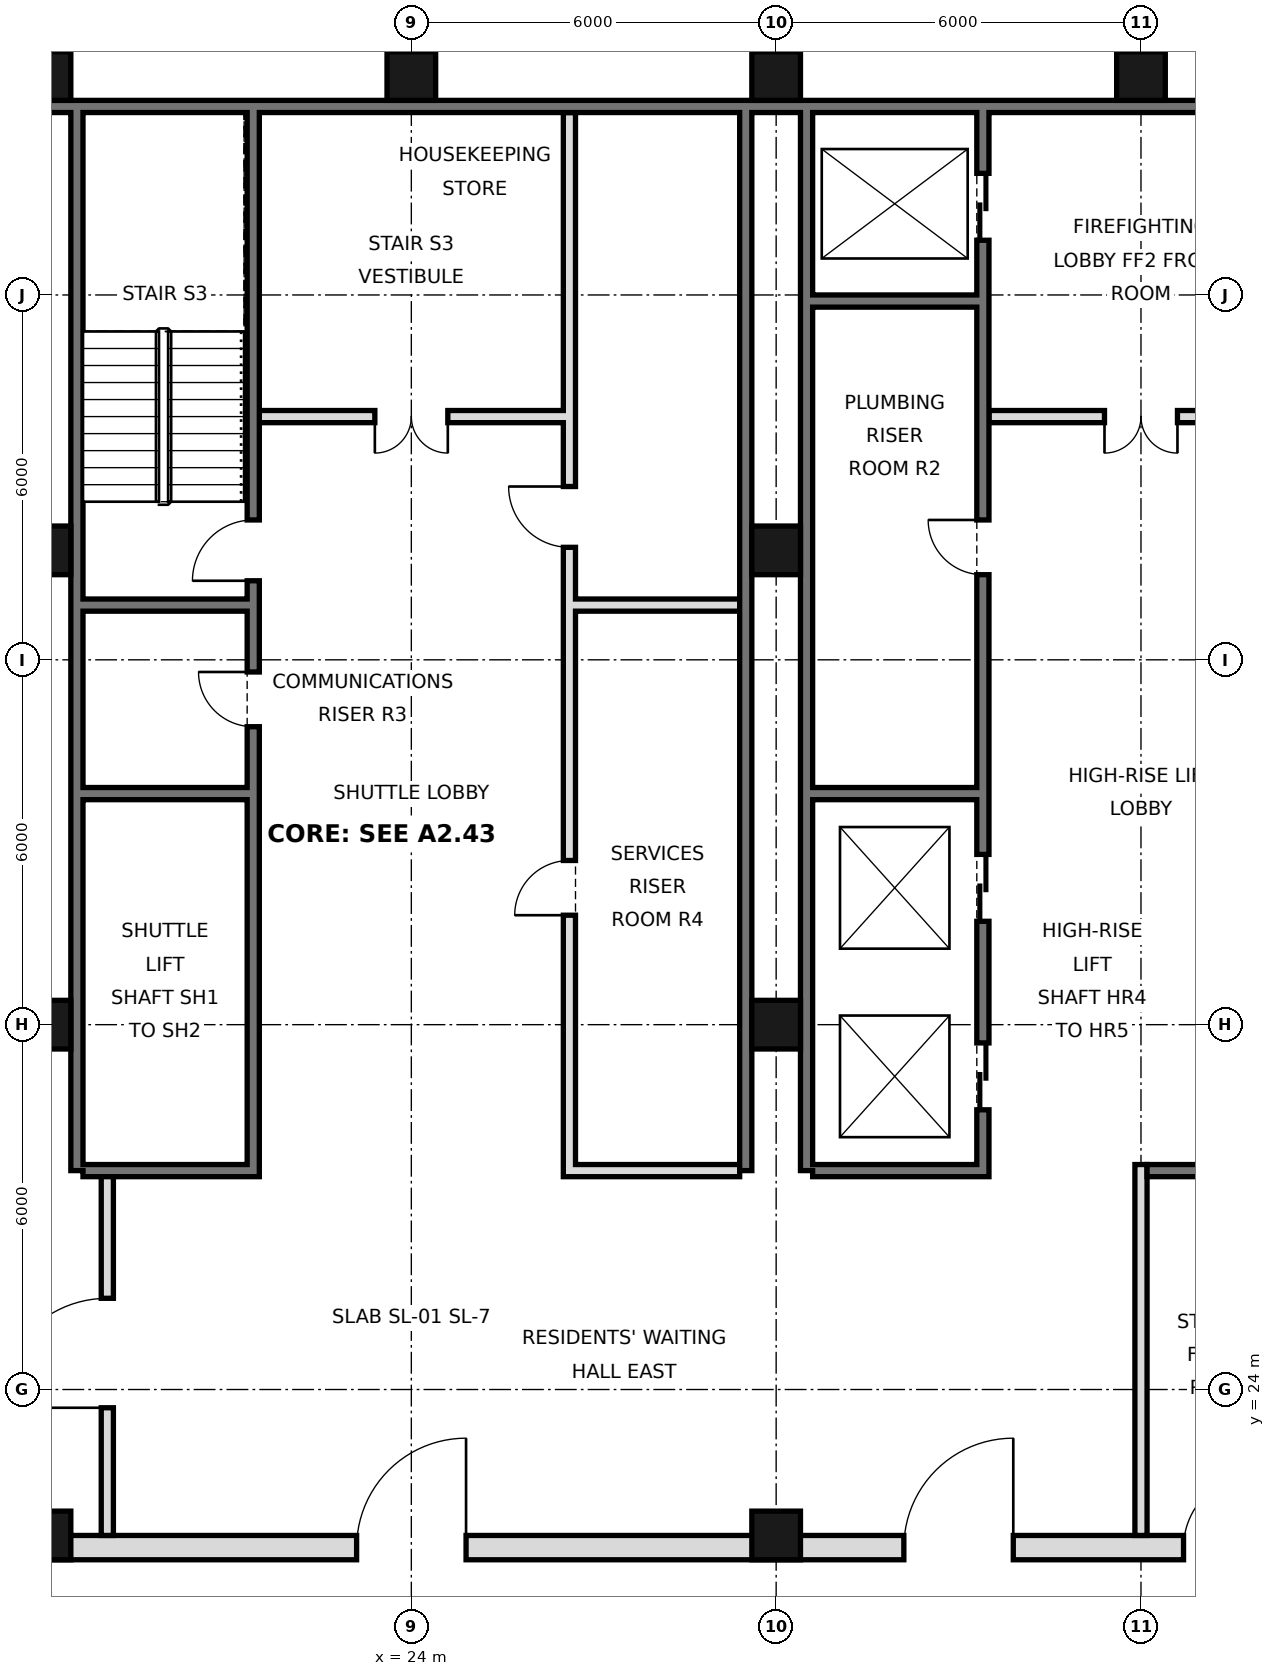
"""IFC4 building model, lengths in metres.
Left out: names, types, materials, properties, quantities, classifications, styles, units other than length and angle.
Written with IfcOpenShell. Run it as: python <this file> out.ifc"""

import sys

from ifc_helpers import new_model, si_unit, direction, frame, frame_2d, origin, origin_2d, place, context, subcontext, project, spatial, rectangle, hollow_rectangle, extrude, element, fill, save


model = new_model("IFC4")
c1 = context("Model", 3, precision=1e-05, world=origin(), true_north=direction((0.0, 1.0)))
c2 = subcontext(c1, "Body", "Model", "MODEL_VIEW")
j1 = project(units=[si_unit("LENGTHUNIT", "METRE"), si_unit("PLANEANGLEUNIT", "RADIAN")], contexts=[c1])
p1 = place(None, origin())
s1 = spatial("IfcSite", under=j1, at=p1, CompositionType="ELEMENT")
p2 = place(p1, origin())
s2 = spatial("IfcBuilding", under=s1, at=p2, CompositionType="ELEMENT")
p3 = place(p2, frame((0.0, 0.0, 170.8)))
s3 = spatial("IfcBuildingStorey", under=s2, at=p3, CompositionType="ELEMENT", Elevation=170.8)
for number, where, z_axis, x_axis in (
    (1, (18.0, 21.6, 0.0), (0.0, 0.0, 1.0), (1.0, 0.0, 0.0)),
    (2, (18.0, 30.0, 0.0), (0.0, 0.0, 1.0), (1.0, 0.0, 0.0)),
    (3, (18.0, 37.8, 0.0), (0.0, 0.0, 1.0), (1.0, 0.0, 0.0)),
    (4, (18.0, 45.6, 0.0), (0.0, 0.0, 1.0), (1.0, 0.0, 0.0)),
    (5, (24.0, 45.6, 0.0), (0.0, 0.0, 1.0), (1.0, 0.0, 0.0)),
    (6, (30.0, 21.6, 0.0), (0.0, 0.0, 1.0), (1.0, 0.0, 0.0)),
    (7, (30.0, 30.0, 0.0), (0.0, 0.0, 1.0), (1.0, 0.0, 0.0)),
    (8, (30.0, 37.8, 0.0), (0.0, 0.0, 1.0), (1.0, 0.0, 0.0)),
    (9, (30.0, 45.6, 0.0), (0.0, 0.0, 1.0), (1.0, 0.0, 0.0)),
    (10, (36.0, 45.6, 0.0), (0.0, 0.0, 1.0), (1.0, 0.0, 0.0)),
):
    element("IfcColumn", number, at=place(p3, frame(where, z_axis=z_axis, x_axis=x_axis)), inside=s3, PredefinedType="COLUMN", context=c2, shape_type="SweptSolid", body=[
        extrude(hollow_rectangle(XDim=0.8, YDim=0.8, WallThickness=0.045, at=origin_2d()), origin(), (0.0, 0.0, 1.0), 3.6),
    ])
p4 = place(p3, frame((6.6, 45.1, 0.0), z_axis=(0.0, 0.0, 1.0), x_axis=(1.0, 0.0, 0.0)))
e11 = element("IfcWall", 11, at=p4, inside=s3, PredefinedType="SOLIDWALL", context=c2, shape_type="SweptSolid", body=[
    extrude(rectangle(XDim=34.8, YDim=0.2, at=frame_2d((17.4, 0.0))), origin(), (0.0, 0.0, 1.0), 3.42),
])
for number, where, z_axis, x_axis in (
    (12, (18.5, 27.6, 0.0), (0.0, 0.0, 1.0), (0.0, 1.0, 0.0)),
    (13, (29.5, 27.6, 0.0), (0.0, 0.0, 1.0), (0.0, 1.0, 0.0)),
    (14, (30.5, 27.6, 0.0), (0.0, 0.0, 1.0), (0.0, 1.0, 0.0)),
):
    element("IfcWall", number, at=place(p3, frame(where, z_axis=z_axis, x_axis=x_axis)), inside=s3, PredefinedType="SOLIDWALL", context=c2, shape_type="SweptSolid", body=[
        extrude(rectangle(XDim=17.5, YDim=0.2, at=frame_2d((8.75, 0.0))), origin(), (0.0, 0.0, 1.0), 3.42),
    ])
p5 = place(p3, frame((5.6, 21.4, 0.0), z_axis=(0.0, 0.0, 1.0), x_axis=(1.0, 0.0, 0.0)))
e15 = element("IfcWall", 15, at=p5, inside=s3, PredefinedType="SOLIDWALL", context=c2, shape_type="SweptSolid", body=[
    extrude(rectangle(XDim=36.8, YDim=0.4, at=frame_2d((18.4, 0.0))), origin(), (0.0, 0.0, 1.0), 3.42),
])
p6 = place(p5, frame((8.5, 0.0, 0.0)))
e16 = element("IfcOpeningElement", 16, at=p6, cuts=e15, PredefinedType="OPENING", context=c2, shape_type="SweptSolid", body=[
    extrude(rectangle(XDim=1.8, YDim=2.1, at=frame_2d((0.9, 1.05))), frame((0.0, 0.21, 0.0), z_axis=(0.0, -1.0, 0.0), x_axis=(1.0, 0.0, 0.0)), (0.0, 0.0, 1.0), 0.42),
])
p7 = place(p5, frame((17.5, 0.0, 0.0)))
e17 = element("IfcOpeningElement", 17, at=p7, cuts=e15, PredefinedType="OPENING", context=c2, shape_type="SweptSolid", body=[
    extrude(rectangle(XDim=1.8, YDim=2.1, at=frame_2d((0.9, 1.05))), frame((0.0, 0.21, 0.0), z_axis=(0.0, -1.0, 0.0), x_axis=(1.0, 0.0, 0.0)), (0.0, 0.0, 1.0), 0.42),
])
p8 = place(p5, frame((26.5, 0.0, 0.0)))
e18 = element("IfcOpeningElement", 18, at=p8, cuts=e15, PredefinedType="OPENING", context=c2, shape_type="SweptSolid", body=[
    extrude(rectangle(XDim=1.8, YDim=2.1, at=frame_2d((0.9, 1.05))), frame((0.0, 0.21, 0.0), z_axis=(0.0, -1.0, 0.0), x_axis=(1.0, 0.0, 0.0)), (0.0, 0.0, 1.0), 0.42),
])
p9 = place(p5, frame((4.5, 0.0, 0.0)))
e19 = element("IfcOpeningElement", 19, at=p9, cuts=e15, PredefinedType="OPENING", context=c2, shape_type="SweptSolid", body=[
    extrude(rectangle(XDim=1.2, YDim=2.1, at=frame_2d((0.6, 1.05))), frame((0.0, 0.21, 0.0), z_axis=(0.0, -1.0, 0.0), x_axis=(1.0, 0.0, 0.0)), (0.0, 0.0, 1.0), 0.42),
])
p10 = place(p5, frame((31.1, 0.0, 0.0)))
e20 = element("IfcOpeningElement", 20, at=p10, cuts=e15, PredefinedType="OPENING", context=c2, shape_type="SweptSolid", body=[
    extrude(rectangle(XDim=1.2, YDim=2.1, at=frame_2d((0.6, 1.05))), frame((0.0, 0.21, 0.0), z_axis=(0.0, -1.0, 0.0), x_axis=(1.0, 0.0, 0.0)), (0.0, 0.0, 1.0), 0.42),
])
p11 = place(p3, frame((19.0, 21.6, 0.0), z_axis=(0.0, 0.0, 1.0), x_axis=(0.0, 1.0, 0.0)))
e21 = element("IfcWall", 21, at=p11, inside=s3, PredefinedType="PARTITIONING", context=c2, shape_type="SweptSolid", body=[
    extrude(rectangle(XDim=6.0, YDim=0.2, at=frame_2d((3.0, 0.0))), origin(), (0.0, 0.0, 1.0), 3.42),
])
p12 = place(p11, frame((2.1, 0.0, 0.0)))
e22 = element("IfcOpeningElement", 22, at=p12, cuts=e21, PredefinedType="OPENING", context=c2, shape_type="SweptSolid", body=[
    extrude(rectangle(XDim=1.8, YDim=2.1, at=frame_2d((0.9, 1.05))), frame((0.0, 0.11, 0.0), z_axis=(0.0, -1.0, 0.0), x_axis=(1.0, 0.0, 0.0)), (0.0, 0.0, 1.0), 0.22),
])
p13 = place(p3, frame((21.4, 27.5, 0.0), z_axis=(0.0, 0.0, 1.0), x_axis=(0.0, 1.0, 0.0)))
e23 = element("IfcWall", 23, at=p13, inside=s3, PredefinedType="SOLIDWALL", context=c2, shape_type="SweptSolid", body=[
    extrude(rectangle(XDim=17.5, YDim=0.2, at=frame_2d((8.75, 0.0))), origin(), (0.0, 0.0, 1.0), 3.42),
])
p14 = place(p13, frame((9.8, 0.0, 0.0)))
e24 = element("IfcOpeningElement", 24, at=p14, cuts=e23, PredefinedType="OPENING", context=c2, shape_type="SweptSolid", body=[
    extrude(rectangle(XDim=1.0, YDim=2.1, at=frame_2d((0.5, 1.05))), frame((0.0, 0.11, 0.0), z_axis=(0.0, -1.0, 0.0), x_axis=(1.0, 0.0, 0.0)), (0.0, 0.0, 1.0), 0.22),
])
p15 = place(p13, frame((7.4, 0.0, 0.0)))
e25 = element("IfcOpeningElement", 25, at=p15, cuts=e23, PredefinedType="OPENING", context=c2, shape_type="SweptSolid", body=[
    extrude(rectangle(XDim=0.9, YDim=2.1, at=frame_2d((0.45, 1.05))), frame((0.0, 0.11, 0.0), z_axis=(0.0, -1.0, 0.0), x_axis=(1.0, 0.0, 0.0)), (0.0, 0.0, 1.0), 0.22),
])
p16 = place(p3, frame((26.6, 27.5, 0.0), z_axis=(0.0, 0.0, 1.0), x_axis=(0.0, 1.0, 0.0)))
e26 = element("IfcWall", 26, at=p16, inside=s3, PredefinedType="SOLIDWALL", context=c2, shape_type="SweptSolid", body=[
    extrude(rectangle(XDim=17.5, YDim=0.2, at=frame_2d((8.75, 0.0))), origin(), (0.0, 0.0, 1.0), 3.42),
])
p17 = place(p16, frame((4.3, 0.0, 0.0)))
e27 = element("IfcOpeningElement", 27, at=p17, cuts=e26, PredefinedType="OPENING", context=c2, shape_type="SweptSolid", body=[
    extrude(rectangle(XDim=0.9, YDim=2.1, at=frame_2d((0.45, 1.05))), frame((0.0, 0.11, 0.0), z_axis=(0.0, -1.0, 0.0), x_axis=(1.0, 0.0, 0.0)), (0.0, 0.0, 1.0), 0.22),
])
p18 = place(p16, frame((10.35, 0.0, 0.0)))
e28 = element("IfcOpeningElement", 28, at=p18, cuts=e26, PredefinedType="OPENING", context=c2, shape_type="SweptSolid", body=[
    extrude(rectangle(XDim=1.0, YDim=2.1, at=frame_2d((0.5, 1.05))), frame((0.0, 0.11, 0.0), z_axis=(0.0, -1.0, 0.0), x_axis=(1.0, 0.0, 0.0)), (0.0, 0.0, 1.0), 0.22),
])
p19 = place(p3, frame((33.4, 27.5, 0.0), z_axis=(0.0, 0.0, 1.0), x_axis=(0.0, 1.0, 0.0)))
e29 = element("IfcWall", 29, at=p19, inside=s3, PredefinedType="SOLIDWALL", context=c2, shape_type="SweptSolid", body=[
    extrude(rectangle(XDim=17.5, YDim=0.2, at=frame_2d((8.75, 0.0))), origin(), (0.0, 0.0, 1.0), 3.42),
])
p20 = place(p19, frame((1.1, 0.0, 0.0)))
e30 = element("IfcOpeningElement", 30, at=p20, cuts=e29, PredefinedType="OPENING", context=c2, shape_type="SweptSolid", body=[
    extrude(rectangle(XDim=1.1, YDim=2.1, at=frame_2d((0.55, 1.05))), frame((0.0, 0.11, 0.0), z_axis=(0.0, -1.0, 0.0), x_axis=(1.0, 0.0, 0.0)), (0.0, 0.0, 1.0), 0.22),
])
p21 = place(p19, frame((4.2, 0.0, 0.0)))
e31 = element("IfcOpeningElement", 31, at=p21, cuts=e29, PredefinedType="OPENING", context=c2, shape_type="SweptSolid", body=[
    extrude(rectangle(XDim=1.1, YDim=2.1, at=frame_2d((0.55, 1.05))), frame((0.0, 0.11, 0.0), z_axis=(0.0, -1.0, 0.0), x_axis=(1.0, 0.0, 0.0)), (0.0, 0.0, 1.0), 0.22),
])
p22 = place(p19, frame((15.4, 0.0, 0.0)))
e32 = element("IfcOpeningElement", 32, at=p22, cuts=e29, PredefinedType="OPENING", context=c2, shape_type="SweptSolid", body=[
    extrude(rectangle(XDim=1.1, YDim=2.1, at=frame_2d((0.55, 1.05))), frame((0.0, 0.11, 0.0), z_axis=(0.0, -1.0, 0.0), x_axis=(1.0, 0.0, 0.0)), (0.0, 0.0, 1.0), 0.22),
])
p23 = place(p19, frame((9.9, 0.0, 0.0)))
e33 = element("IfcOpeningElement", 33, at=p23, cuts=e29, PredefinedType="OPENING", context=c2, shape_type="SweptSolid", body=[
    extrude(rectangle(XDim=0.9, YDim=2.1, at=frame_2d((0.45, 1.05))), frame((0.0, 0.11, 0.0), z_axis=(0.0, -1.0, 0.0), x_axis=(1.0, 0.0, 0.0)), (0.0, 0.0, 1.0), 0.22),
])
p24 = place(p3, frame((36.0, 21.6, 0.0), z_axis=(0.0, 0.0, 1.0), x_axis=(0.0, 1.0, 0.0)))
e34 = element("IfcWall", 34, at=p24, inside=s3, PredefinedType="PARTITIONING", context=c2, shape_type="SweptSolid", body=[
    extrude(rectangle(XDim=6.1, YDim=0.2, at=frame_2d((3.05, 0.0))), origin(), (0.0, 0.0, 1.0), 3.42),
])
for number, where, z_axis, x_axis in (
    (35, (18.6, 27.6, 0.0), (0.0, 0.0, 1.0), (1.0, 0.0, 0.0)),
    (36, (26.7, 27.6, 0.0), (0.0, 0.0, 1.0), (1.0, 0.0, 0.0)),
    (37, (30.6, 27.6, 0.0), (0.0, 0.0, 1.0), (1.0, 0.0, 0.0)),
):
    element("IfcWall", number, at=place(p3, frame(where, z_axis=z_axis, x_axis=x_axis)), inside=s3, PredefinedType="SOLIDWALL", context=c2, shape_type="SweptSolid", body=[
        extrude(rectangle(XDim=2.7, YDim=0.2, at=frame_2d((1.35, 0.0))), origin(), (0.0, 0.0, 1.0), 3.42),
    ])
p25 = place(p3, frame((36.1, 27.6, 0.0), z_axis=(0.0, 0.0, 1.0), x_axis=(1.0, 0.0, 0.0)))
e38 = element("IfcWall", 38, at=p25, inside=s3, PredefinedType="SOLIDWALL", context=c2, shape_type="SweptSolid", body=[
    extrude(rectangle(XDim=5.3, YDim=0.2, at=frame_2d((2.65, 0.0))), origin(), (0.0, 0.0, 1.0), 3.42),
])
for number, where, z_axis, x_axis in (
    (39, (18.6, 33.8, 0.0), (0.0, 0.0, 1.0), (1.0, 0.0, 0.0)),
    (40, (30.6, 33.8, 0.0), (0.0, 0.0, 1.0), (1.0, 0.0, 0.0)),
    (41, (18.6, 36.9, 0.0), (0.0, 0.0, 1.0), (1.0, 0.0, 0.0)),
    (42, (26.7, 36.9, 0.0), (0.0, 0.0, 1.0), (1.0, 0.0, 0.0)),
):
    element("IfcWall", number, at=place(p3, frame(where, z_axis=z_axis, x_axis=x_axis)), inside=s3, PredefinedType="SOLIDWALL", context=c2, shape_type="SweptSolid", body=[
        extrude(rectangle(XDim=2.7, YDim=0.2, at=frame_2d((1.35, 0.0))), origin(), (0.0, 0.0, 1.0), 3.42),
    ])
p26 = place(p3, frame((21.5, 40.0, 0.0), z_axis=(0.0, 0.0, 1.0), x_axis=(1.0, 0.0, 0.0)))
e43 = element("IfcWall", 43, at=p26, inside=s3, PredefinedType="PARTITIONING", context=c2, shape_type="SweptSolid", body=[
    extrude(rectangle(XDim=5.0, YDim=0.2, at=frame_2d((2.5, 0.0))), origin(), (0.0, 0.0, 1.0), 3.42),
])
p27 = place(p26, frame((1.9, 0.0, 0.0)))
e44 = element("IfcOpeningElement", 44, at=p27, cuts=e43, PredefinedType="OPENING", context=c2, shape_type="SweptSolid", body=[
    extrude(rectangle(XDim=1.2, YDim=2.1, at=frame_2d((0.6, 1.05))), frame((0.0, 0.11, 0.0), z_axis=(0.0, -1.0, 0.0), x_axis=(1.0, 0.0, 0.0)), (0.0, 0.0, 1.0), 0.22),
])
p28 = place(p3, frame((33.5, 40.0, 0.0), z_axis=(0.0, 0.0, 1.0), x_axis=(1.0, 0.0, 0.0)))
e45 = element("IfcWall", 45, at=p28, inside=s3, PredefinedType="PARTITIONING", context=c2, shape_type="SweptSolid", body=[
    extrude(rectangle(XDim=5.0, YDim=0.2, at=frame_2d((2.5, 0.0))), origin(), (0.0, 0.0, 1.0), 3.42),
])
p29 = place(p28, frame((1.9, 0.0, 0.0)))
e46 = element("IfcOpeningElement", 46, at=p29, cuts=e45, PredefinedType="OPENING", context=c2, shape_type="SweptSolid", body=[
    extrude(rectangle(XDim=1.2, YDim=2.1, at=frame_2d((0.6, 1.05))), frame((0.0, 0.11, 0.0), z_axis=(0.0, -1.0, 0.0), x_axis=(1.0, 0.0, 0.0)), (0.0, 0.0, 1.0), 0.22),
])
p30 = place(p3, frame((30.6, 41.9, 0.0), z_axis=(0.0, 0.0, 1.0), x_axis=(1.0, 0.0, 0.0)))
e47 = element("IfcWall", 47, at=p30, inside=s3, PredefinedType="SOLIDWALL", context=c2, shape_type="SweptSolid", body=[
    extrude(rectangle(XDim=2.7, YDim=0.2, at=frame_2d((1.35, 0.0))), origin(), (0.0, 0.0, 1.0), 3.42),
])
p31 = place(p12, origin())
e48 = element("IfcDoor", 48, at=p31, inside=s3, OperationType="SINGLE_SWING_LEFT", PredefinedType="DOOR", context=c2, shape_type="SweptSolid", body=[
    extrude(rectangle(XDim=1.8, YDim=2.1, at=frame_2d((0.9, 1.05))), frame((0.0, 0.025, 0.0), z_axis=(0.0, -1.0, 0.0), x_axis=(1.0, 0.0, 0.0)), (0.0, 0.0, 1.0), 0.05),
])
fill(e22, e48)
p32 = place(p7, frame((1.8, 0.0, 0.0), z_axis=(0.0, 0.0, 1.0), x_axis=(-1.0, 0.0, 0.0)))
e49 = element("IfcDoor", 49, at=p32, inside=s3, OperationType="SINGLE_SWING_LEFT", PredefinedType="DOOR", context=c2, shape_type="SweptSolid", body=[
    extrude(rectangle(XDim=1.8, YDim=2.1, at=frame_2d((0.9, 1.05))), frame((0.0, 0.025, 0.0), z_axis=(0.0, -1.0, 0.0), x_axis=(1.0, 0.0, 0.0)), (0.0, 0.0, 1.0), 0.05),
])
fill(e17, e49)
p33 = place(p8, frame((1.8, 0.0, 0.0), z_axis=(0.0, 0.0, 1.0), x_axis=(-1.0, 0.0, 0.0)))
e50 = element("IfcDoor", 50, at=p33, inside=s3, OperationType="SINGLE_SWING_LEFT", PredefinedType="DOOR", context=c2, shape_type="SweptSolid", body=[
    extrude(rectangle(XDim=1.8, YDim=2.1, at=frame_2d((0.9, 1.05))), frame((0.0, 0.025, 0.0), z_axis=(0.0, -1.0, 0.0), x_axis=(1.0, 0.0, 0.0)), (0.0, 0.0, 1.0), 0.05),
])
fill(e18, e50)
p34 = place(p10, frame((1.2, 0.0, 0.0), z_axis=(0.0, 0.0, 1.0), x_axis=(-1.0, 0.0, 0.0)))
e51 = element("IfcDoor", 51, at=p34, inside=s3, OperationType="SINGLE_SWING_LEFT", PredefinedType="DOOR", context=c2, shape_type="SweptSolid", body=[
    extrude(rectangle(XDim=1.2, YDim=2.1, at=frame_2d((0.6, 1.05))), frame((0.0, 0.025, 0.0), z_axis=(0.0, -1.0, 0.0), x_axis=(1.0, 0.0, 0.0)), (0.0, 0.0, 1.0), 0.05),
])
fill(e20, e51)
p35 = place(p27, frame((1.2, 0.0, 0.0), z_axis=(0.0, 0.0, 1.0), x_axis=(-1.0, 0.0, 0.0)))
e52 = element("IfcDoor", 52, at=p35, inside=s3, OperationType="DOUBLE_DOOR_SINGLE_SWING", PredefinedType="DOOR", context=c2, shape_type="SweptSolid", body=[
    extrude(rectangle(XDim=1.2, YDim=2.1, at=frame_2d((0.6, 1.05))), frame((0.0, 0.025, 0.0), z_axis=(0.0, -1.0, 0.0), x_axis=(1.0, 0.0, 0.0)), (0.0, 0.0, 1.0), 0.05),
])
fill(e44, e52)
p36 = place(p29, frame((1.2, 0.0, 0.0), z_axis=(0.0, 0.0, 1.0), x_axis=(-1.0, 0.0, 0.0)))
e53 = element("IfcDoor", 53, at=p36, inside=s3, OperationType="DOUBLE_DOOR_SINGLE_SWING", PredefinedType="DOOR", context=c2, shape_type="SweptSolid", body=[
    extrude(rectangle(XDim=1.2, YDim=2.1, at=frame_2d((0.6, 1.05))), frame((0.0, 0.025, 0.0), z_axis=(0.0, -1.0, 0.0), x_axis=(1.0, 0.0, 0.0)), (0.0, 0.0, 1.0), 0.05),
])
fill(e46, e53)
p37 = place(p20, origin())
e54 = element("IfcDoor", 54, at=p37, inside=s3, OperationType="DOUBLE_DOOR_SLIDING", PredefinedType="DOOR", context=c2, shape_type="SweptSolid", body=[
    extrude(rectangle(XDim=1.1, YDim=2.1, at=frame_2d((0.55, 1.05))), frame((0.0, 0.025, 0.0), z_axis=(0.0, -1.0, 0.0), x_axis=(1.0, 0.0, 0.0)), (0.0, 0.0, 1.0), 0.05),
])
fill(e30, e54)
p38 = place(p21, origin())
e55 = element("IfcDoor", 55, at=p38, inside=s3, OperationType="DOUBLE_DOOR_SLIDING", PredefinedType="DOOR", context=c2, shape_type="SweptSolid", body=[
    extrude(rectangle(XDim=1.1, YDim=2.1, at=frame_2d((0.55, 1.05))), frame((0.0, 0.025, 0.0), z_axis=(0.0, -1.0, 0.0), x_axis=(1.0, 0.0, 0.0)), (0.0, 0.0, 1.0), 0.05),
])
fill(e31, e55)
p39 = place(p22, origin())
e56 = element("IfcDoor", 56, at=p39, inside=s3, OperationType="DOUBLE_DOOR_SLIDING", PredefinedType="DOOR", context=c2, shape_type="SweptSolid", body=[
    extrude(rectangle(XDim=1.1, YDim=2.1, at=frame_2d((0.55, 1.05))), frame((0.0, 0.025, 0.0), z_axis=(0.0, -1.0, 0.0), x_axis=(1.0, 0.0, 0.0)), (0.0, 0.0, 1.0), 0.05),
])
fill(e32, e56)
p40 = place(p14, origin())
e57 = element("IfcDoor", 57, at=p40, inside=s3, OperationType="SINGLE_SWING_LEFT", PredefinedType="DOOR", context=c2, shape_type="SweptSolid", body=[
    extrude(rectangle(XDim=1.0, YDim=2.1, at=frame_2d((0.5, 1.05))), frame((0.0, 0.025, 0.0), z_axis=(0.0, -1.0, 0.0), x_axis=(1.0, 0.0, 0.0)), (0.0, 0.0, 1.0), 0.05),
])
fill(e24, e57)
p41 = place(p23, frame((0.9, 0.0, 0.0), z_axis=(0.0, 0.0, 1.0), x_axis=(-1.0, 0.0, 0.0)))
e58 = element("IfcDoor", 58, at=p41, inside=s3, OperationType="SINGLE_SWING_LEFT", PredefinedType="DOOR", context=c2, shape_type="SweptSolid", body=[
    extrude(rectangle(XDim=0.9, YDim=2.1, at=frame_2d((0.45, 1.05))), frame((0.0, 0.025, 0.0), z_axis=(0.0, -1.0, 0.0), x_axis=(1.0, 0.0, 0.0)), (0.0, 0.0, 1.0), 0.05),
])
fill(e33, e58)
p42 = place(p15, frame((0.9, 0.0, 0.0), z_axis=(0.0, 0.0, 1.0), x_axis=(-1.0, 0.0, 0.0)))
e59 = element("IfcDoor", 59, at=p42, inside=s3, OperationType="SINGLE_SWING_LEFT", PredefinedType="DOOR", context=c2, shape_type="SweptSolid", body=[
    extrude(rectangle(XDim=0.9, YDim=2.1, at=frame_2d((0.45, 1.05))), frame((0.0, 0.025, 0.0), z_axis=(0.0, -1.0, 0.0), x_axis=(1.0, 0.0, 0.0)), (0.0, 0.0, 1.0), 0.05),
])
fill(e25, e59)
p43 = place(p17, origin())
e60 = element("IfcDoor", 60, at=p43, inside=s3, OperationType="SINGLE_SWING_LEFT", PredefinedType="DOOR", context=c2, shape_type="SweptSolid", body=[
    extrude(rectangle(XDim=0.9, YDim=2.1, at=frame_2d((0.45, 1.05))), frame((0.0, 0.025, 0.0), z_axis=(0.0, -1.0, 0.0), x_axis=(1.0, 0.0, 0.0)), (0.0, 0.0, 1.0), 0.05),
])
fill(e27, e60)
p44 = place(p18, frame((1.0, 0.0, 0.0), z_axis=(0.0, 0.0, 1.0), x_axis=(-1.0, 0.0, 0.0)))
e61 = element("IfcDoor", 61, at=p44, inside=s3, OperationType="SINGLE_SWING_LEFT", PredefinedType="DOOR", context=c2, shape_type="SweptSolid", body=[
    extrude(rectangle(XDim=1.0, YDim=2.1, at=frame_2d((0.5, 1.05))), frame((0.0, 0.025, 0.0), z_axis=(0.0, -1.0, 0.0), x_axis=(1.0, 0.0, 0.0)), (0.0, 0.0, 1.0), 0.05),
])
fill(e28, e61)
save(model, sys.argv[1])
